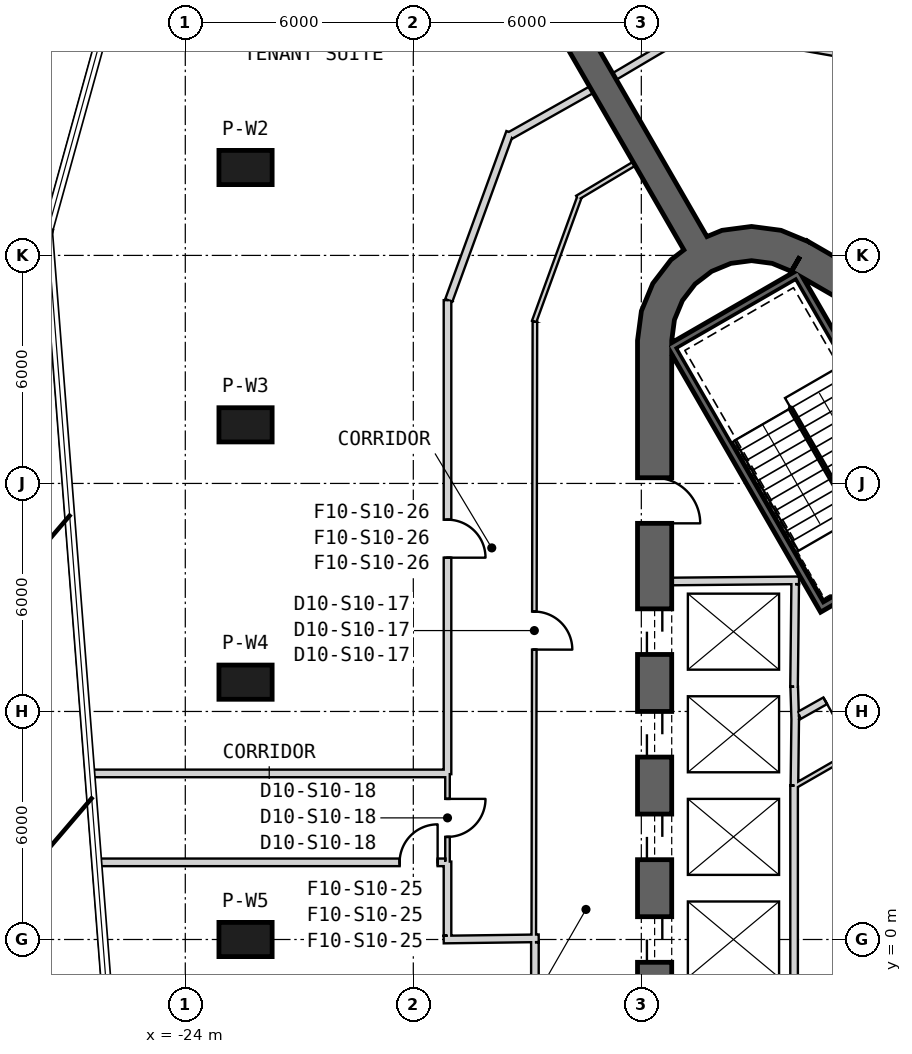
"""IFC4 building model, lengths in metres.
Left out: names, types, materials, properties, quantities, classifications, styles, units other than length and angle.
Written with IfcOpenShell. Run it as: python <this file> out.ifc"""

import sys

from ifc_helpers import new_model, si_unit, direction, frame, frame_2d, origin, origin_2d, place, context, subcontext, project, spatial, polyline, rectangle, outline, extrude, element, fill, save


model = new_model("IFC4")
c1 = context("Model", 3, precision=1e-05, world=origin(), true_north=direction((0.0, 1.0)))
c2 = subcontext(c1, "Body", "Model", "MODEL_VIEW")
j1 = project(units=[si_unit("LENGTHUNIT", "METRE"), si_unit("PLANEANGLEUNIT", "RADIAN")], contexts=[c1])
p1 = place(None, origin())
s1 = spatial("IfcSite", under=j1, at=p1, CompositionType="ELEMENT")
p2 = place(p1, origin())
s2 = spatial("IfcBuilding", under=s1, at=p2, CompositionType="ELEMENT")
p3 = place(p2, frame((0.0, 0.0, 181.2)))
s3 = spatial("IfcBuildingStorey", under=s2, at=p3, CompositionType="ELEMENT", Elevation=181.2)
for number, where, z_axis, x_axis in (
    (1, (-22.415, 20.313, 0.0), (0.0, 0.0, 1.0), (-1.0, 0.0, 0.0)),
    (2, (-22.415, 13.542, 0.0), (0.0, 0.0, 1.0), (-1.0, 0.0, 0.0)),
    (3, (-22.415, 6.771, 0.0), (0.0, 0.0, 1.0), (-1.0, 0.0, 0.0)),
    (4, (-22.415, 0.0, 0.0), (0.0, 0.0, 1.0), (-1.0, 0.0, 0.0)),
):
    element("IfcColumn", number, at=place(p3, frame(where, z_axis=z_axis, x_axis=x_axis)), inside=s3, PredefinedType="COLUMN", context=c2, shape_type="SweptSolid", body=[
        extrude(rectangle(XDim=1.4, YDim=0.9, at=origin_2d()), origin(), (0.0, 0.0, 1.0), 4.0),
    ])
p4 = place(p3, frame((19.475, 2.208, 0.0), z_axis=(0.0, 0.0, 1.0), x_axis=(-0.866028369851, 0.499994862586, 0.0)))
e5 = element("IfcWall", 5, at=p4, inside=s3, PredefinedType="SHEAR", context=c2, shape_type="SweptSolid", body=[
    extrude(rectangle(XDim=31.523, YDim=0.9, at=frame_2d((15.762, 0.0))), origin(), (0.0, 0.0, 1.0), 4.0),
])
p5 = place(p4, frame((7.062, 0.0, 0.0)))
e6 = element("IfcOpeningElement", 6, at=p5, cuts=e5, PredefinedType="OPENING", context=c2, shape_type="SweptSolid", body=[
    extrude(rectangle(XDim=1.2, YDim=2.4, at=frame_2d((0.6, 1.2))), frame((0.0, 0.46, 0.0), z_axis=(0.0, -1.0, 0.0), x_axis=(1.0, 0.0, 0.0)), (0.0, 0.0, 1.0), 0.92),
])
p6 = place(p4, frame((3.612, 0.0, 0.0)))
e7 = element("IfcOpeningElement", 7, at=p6, cuts=e5, PredefinedType="OPENING", context=c2, shape_type="SweptSolid", body=[
    extrude(rectangle(XDim=1.2, YDim=2.4, at=frame_2d((0.6, 1.2))), frame((0.0, 0.46, 0.0), z_axis=(0.0, -1.0, 0.0), x_axis=(1.0, 0.0, 0.0)), (0.0, 0.0, 1.0), 0.92),
])
p7 = place(p4, frame((26.712, 0.0, 0.0)))
e8 = element("IfcOpeningElement", 8, at=p7, cuts=e5, PredefinedType="OPENING", context=c2, shape_type="SweptSolid", body=[
    extrude(rectangle(XDim=1.2, YDim=2.4, at=frame_2d((0.6, 1.2))), frame((0.0, 0.46, 0.0), z_axis=(0.0, -1.0, 0.0), x_axis=(1.0, 0.0, 0.0)), (0.0, 0.0, 1.0), 0.92),
])
p8 = place(p3, frame((-11.65, 15.762, 0.0), z_axis=(0.0, 0.0, 1.0), x_axis=(0.0, -1.0, 0.0)))
e9 = element("IfcWall", 9, at=p8, inside=s3, PredefinedType="SHEAR", context=c2, shape_type="SweptSolid", body=[
    extrude(rectangle(XDim=31.523, YDim=0.9, at=frame_2d((15.762, 0.0))), origin(), (0.0, 0.0, 1.0), 4.0),
])
p9 = place(p8, frame((7.062, 0.0, 0.0)))
e10 = element("IfcOpeningElement", 10, at=p9, cuts=e9, PredefinedType="OPENING", context=c2, shape_type="SweptSolid", body=[
    extrude(rectangle(XDim=1.2, YDim=2.4, at=frame_2d((0.6, 1.2))), frame((0.0, 0.46, 0.0), z_axis=(0.0, -1.0, 0.0), x_axis=(1.0, 0.0, 0.0)), (0.0, 0.0, 1.0), 0.92),
])
p10 = place(p8, frame((9.762, 0.0, 0.0)))
e11 = element("IfcOpeningElement", 11, at=p10, cuts=e9, PredefinedType="OPENING", context=c2, shape_type="SweptSolid", body=[
    extrude(rectangle(XDim=1.2, YDim=2.4, at=frame_2d((0.6, 1.2))), frame((0.0, 0.46, 0.0), z_axis=(0.0, -1.0, 0.0), x_axis=(1.0, 0.0, 0.0)), (0.0, 0.0, 1.0), 0.92),
])
p11 = place(p8, frame((12.462, 0.0, 0.0)))
e12 = element("IfcOpeningElement", 12, at=p11, cuts=e9, PredefinedType="OPENING", context=c2, shape_type="SweptSolid", body=[
    extrude(rectangle(XDim=1.2, YDim=2.4, at=frame_2d((0.6, 1.2))), frame((0.0, 0.46, 0.0), z_axis=(0.0, -1.0, 0.0), x_axis=(1.0, 0.0, 0.0)), (0.0, 0.0, 1.0), 0.92),
])
p12 = place(p8, frame((15.162, 0.0, 0.0)))
e13 = element("IfcOpeningElement", 13, at=p12, cuts=e9, PredefinedType="OPENING", context=c2, shape_type="SweptSolid", body=[
    extrude(rectangle(XDim=1.2, YDim=2.4, at=frame_2d((0.6, 1.2))), frame((0.0, 0.46, 0.0), z_axis=(0.0, -1.0, 0.0), x_axis=(1.0, 0.0, 0.0)), (0.0, 0.0, 1.0), 0.92),
])
p13 = place(p8, frame((17.862, 0.0, 0.0)))
e14 = element("IfcOpeningElement", 14, at=p13, cuts=e9, PredefinedType="OPENING", context=c2, shape_type="SweptSolid", body=[
    extrude(rectangle(XDim=1.2, YDim=2.4, at=frame_2d((0.6, 1.2))), frame((0.0, 0.46, 0.0), z_axis=(0.0, -1.0, 0.0), x_axis=(1.0, 0.0, 0.0)), (0.0, 0.0, 1.0), 0.92),
])
p14 = place(p8, frame((20.562, 0.0, 0.0)))
e15 = element("IfcOpeningElement", 15, at=p14, cuts=e9, PredefinedType="OPENING", context=c2, shape_type="SweptSolid", body=[
    extrude(rectangle(XDim=1.2, YDim=2.4, at=frame_2d((0.6, 1.2))), frame((0.0, 0.46, 0.0), z_axis=(0.0, -1.0, 0.0), x_axis=(1.0, 0.0, 0.0)), (0.0, 0.0, 1.0), 0.92),
])
p15 = place(p8, frame((23.262, 0.0, 0.0)))
e16 = element("IfcOpeningElement", 16, at=p15, cuts=e9, PredefinedType="OPENING", context=c2, shape_type="SweptSolid", body=[
    extrude(rectangle(XDim=1.2, YDim=2.4, at=frame_2d((0.6, 1.2))), frame((0.0, 0.46, 0.0), z_axis=(0.0, -1.0, 0.0), x_axis=(1.0, 0.0, 0.0)), (0.0, 0.0, 1.0), 0.92),
])
p16 = place(p8, frame((3.612, 0.0, 0.0)))
e17 = element("IfcOpeningElement", 17, at=p16, cuts=e9, PredefinedType="OPENING", context=c2, shape_type="SweptSolid", body=[
    extrude(rectangle(XDim=1.2, YDim=2.4, at=frame_2d((0.6, 1.2))), frame((0.0, 0.46, 0.0), z_axis=(0.0, -1.0, 0.0), x_axis=(1.0, 0.0, 0.0)), (0.0, 0.0, 1.0), 0.92),
])
p17 = place(p8, frame((26.712, 0.0, 0.0)))
e18 = element("IfcOpeningElement", 18, at=p17, cuts=e9, PredefinedType="OPENING", context=c2, shape_type="SweptSolid", body=[
    extrude(rectangle(XDim=1.2, YDim=2.4, at=frame_2d((0.6, 1.2))), frame((0.0, 0.46, 0.0), z_axis=(0.0, -1.0, 0.0), x_axis=(1.0, 0.0, 0.0)), (0.0, 0.0, 1.0), 0.92),
])
p18 = place(p3, origin())
e19 = element("IfcWall", 19, at=p18, inside=s3, PredefinedType="SHEAR", context=c2, shape_type="SweptSolid", body=[
    extrude(outline(polyline([(-7.6, 18.36), (-8.323, 18.659), (-9.1, 18.762), (-9.876, 18.659), (-10.6, 18.36), (-11.221, 17.883), (-11.698, 17.262), (-11.998, 16.538), (-12.1, 15.762), (-11.2, 15.762), (-11.128, 16.305), (-10.919, 16.812), (-10.585, 17.247), (-10.15, 17.58), (-9.644, 17.79), (-9.1, 17.862), (-8.556, 17.79), (-8.05, 17.58), (-7.6, 18.36)])), origin(), (0.0, 0.0, 1.0), 4.0),
])
p19 = place(p3, frame((-10.575, 18.316, 0.0), z_axis=(0.0, 0.0, 1.0), x_axis=(-0.500002625756, 0.866023887798, 0.0)))
e20 = element("IfcWall", 20, at=p19, inside=s3, PredefinedType="SHEAR", context=c2, shape_type="SweptSolid", body=[
    extrude(rectangle(XDim=12.22, YDim=0.7, at=frame_2d((6.11, 0.0))), origin(), (0.0, 0.0, 1.0), 4.0),
])
p20 = place(p3, frame((-11.2, 9.42, 0.0), z_axis=(0.0, 0.0, 1.0), x_axis=(0.999957167047, 0.009255488683, 0.0)))
e21 = element("IfcWall", 21, at=p20, inside=s3, PredefinedType="PLUMBINGWALL", context=c2, shape_type="SweptSolid", body=[
    extrude(rectangle(XDim=3.35, YDim=0.2, at=frame_2d((1.675, 0.0))), origin(), (0.0, 0.0, 1.0), 3.7),
])
p21 = place(p3, frame((-7.951, 9.35, 0.0), z_axis=(0.0, 0.0, 1.0), x_axis=(-0.011120469654, -0.999938165666, 0.0)))
e22 = element("IfcWall", 22, at=p21, inside=s3, PredefinedType="PLUMBINGWALL", context=c2, shape_type="SweptSolid", body=[
    extrude(rectangle(XDim=2.7, YDim=0.2, at=frame_2d((1.35, 0.0))), origin(), (0.0, 0.0, 1.0), 3.7),
])
p22 = place(p3, frame((-7.977, 6.65, 0.0), z_axis=(0.0, 0.0, 1.0), x_axis=(0.030861509705, -0.999523670164, 0.0)))
e23 = element("IfcWall", 23, at=p22, inside=s3, PredefinedType="PLUMBINGWALL", context=c2, shape_type="SweptSolid", body=[
    extrude(rectangle(XDim=0.878, YDim=0.2, at=frame_2d((0.439, 0.0))), origin(), (0.0, 0.0, 1.0), 3.7),
])
p23 = place(p3, frame((-7.949, 5.895, 0.0), z_axis=(0.0, 0.0, 1.0), x_axis=(-0.012042535896, -0.999927486035, 0.0)))
e24 = element("IfcWall", 24, at=p23, inside=s3, PredefinedType="PLUMBINGWALL", context=c2, shape_type="SweptSolid", body=[
    extrude(rectangle(XDim=1.845, YDim=0.2, at=frame_2d((0.922, 0.0))), origin(), (0.0, 0.0, 1.0), 3.7),
])
p24 = place(p3, frame((-7.98, 4.05, 0.0), z_axis=(0.0, 0.0, 1.0), x_axis=(0.0, -1.0, 0.0)))
e25 = element("IfcWall", 25, at=p24, inside=s3, PredefinedType="PLUMBINGWALL", context=c2, shape_type="SweptSolid", body=[
    extrude(rectangle(XDim=8.1, YDim=0.2, at=frame_2d((4.05, 0.0))), origin(), (0.0, 0.0, 1.0), 3.7),
])
p25 = place(p3, frame((-11.245, 15.678, -0.3), z_axis=(0.0, 0.0, 1.0), x_axis=(0.499977274689, -0.866038523851, 0.0)))
e26 = element("IfcWall", 26, at=p25, inside=s3, PredefinedType="SHEAR", context=c2, shape_type="SweptSolid", body=[
    extrude(rectangle(XDim=8.1, YDim=0.2, at=frame_2d((4.05, 0.0))), origin(), (0.0, 0.0, 1.0), 4.0),
])
p26 = place(p3, frame((-7.818, 17.541, -0.3), z_axis=(0.0, 0.0, 1.0), x_axis=(-0.866044365799, -0.499967155389, 0.0)))
e27 = element("IfcWall", 27, at=p26, inside=s3, PredefinedType="SHEAR", context=c2, shape_type="SweptSolid", body=[
    extrude(rectangle(XDim=3.8, YDim=0.2, at=frame_2d((1.9, 0.0))), origin(), (0.0, 0.0, 1.0), 4.0),
])
p27 = place(p3, frame((-7.854, 17.405, -0.3), z_axis=(0.0, 0.0, 1.0), x_axis=(0.499997992926, -0.866026562566, 0.0)))
e28 = element("IfcWall", 28, at=p27, inside=s3, PredefinedType="SHEAR", context=c2, shape_type="SweptSolid", body=[
    extrude(rectangle(XDim=7.9, YDim=0.2, at=frame_2d((3.95, 0.0))), origin(), (0.0, 0.0, 1.0), 4.0),
])
p28 = place(p3, frame((-7.159, 8.8, -0.3), z_axis=(0.0, 0.0, 1.0), x_axis=(0.866047807691, 0.499961193289, 0.0)))
e29 = element("IfcWall", 29, at=p28, inside=s3, PredefinedType="SHEAR", context=c2, shape_type="SweptSolid", body=[
    extrude(rectangle(XDim=3.6, YDim=0.2, at=frame_2d((1.8, 0.0))), origin(), (0.0, 0.0, 1.0), 4.0),
])
p29 = place(p28, frame((1.25, 0.0, 0.3)))
e30 = element("IfcOpeningElement", 30, at=p29, cuts=e29, PredefinedType="OPENING", context=c2, shape_type="SweptSolid", body=[
    extrude(rectangle(XDim=1.1, YDim=2.1, at=frame_2d((0.55, 1.05))), frame((0.0, 0.11, 0.0), z_axis=(0.0, -1.0, 0.0), x_axis=(1.0, 0.0, 0.0)), (0.0, 0.0, 1.0), 0.22),
])
p30 = place(p3, frame((-5.6, 7.16, 0.0), z_axis=(0.0, 0.0, 1.0), x_axis=(-0.871363259478, -0.490638431059, 0.0)))
e31 = element("IfcWall", 31, at=p30, inside=s3, PredefinedType="PARTITIONING", context=c2, shape_type="SweptSolid", body=[
    extrude(rectangle(XDim=2.581, YDim=0.2, at=frame_2d((1.291, 0.0))), origin(), (0.0, 0.0, 1.0), 3.7),
])
p31 = place(p30, frame((0.791, 0.0, 0.0)))
e32 = element("IfcOpeningElement", 32, at=p31, cuts=e31, PredefinedType="OPENING", context=c2, shape_type="SweptSolid", body=[
    extrude(rectangle(XDim=1.0, YDim=2.1, at=frame_2d((0.5, 1.05))), frame((0.0, 0.11, 0.0), z_axis=(0.0, -1.0, 0.0), x_axis=(1.0, 0.0, 0.0)), (0.0, 0.0, 1.0), 0.22),
])
p32 = place(p3, frame((-6.201, 5.046, 0.0), z_axis=(0.0, 0.0, 1.0), x_axis=(-0.867071050325, -0.498184497639, 0.0)))
e33 = element("IfcWall", 33, at=p32, inside=s3, PredefinedType="PARTITIONING", context=c2, shape_type="SweptSolid", body=[
    extrude(rectangle(XDim=2.017, YDim=0.12, at=frame_2d((1.008, 0.0))), origin(), (0.0, 0.0, 1.0), 3.7),
])
p33 = place(p3, frame((-12.189, 20.411, 0.0), z_axis=(0.0, 0.0, 1.0), x_axis=(-0.858492721014, -0.51282574815, 0.0)))
e34 = element("IfcWall", 34, at=p33, inside=s3, PredefinedType="PARTITIONING", context=c2, shape_type="SweptSolid", body=[
    extrude(rectangle(XDim=1.742, YDim=0.12, at=frame_2d((0.871, 0.0))), origin(), (0.0, 0.0, 1.0), 3.7),
])
p34 = place(p3, frame((-13.631, 19.53, 0.0), z_axis=(0.0, 0.0, 1.0), x_axis=(-0.342069878069, -0.939674517329, 0.0)))
e35 = element("IfcWall", 35, at=p34, inside=s3, PredefinedType="PARTITIONING", context=c2, shape_type="SweptSolid", body=[
    extrude(rectangle(XDim=3.479, YDim=0.12, at=frame_2d((1.739, 0.0))), origin(), (0.0, 0.0, 1.0), 2.78),
])
p35 = place(p3, frame((-14.8, 16.257, 0.0), z_axis=(0.0, 0.0, 1.0), x_axis=(-0.001847148781, -0.999998294019, 0.0)))
e36 = element("IfcWall", 36, at=p35, inside=s3, PredefinedType="PARTITIONING", context=c2, shape_type="SweptSolid", body=[
    extrude(rectangle(XDim=16.257, YDim=0.12, at=frame_2d((8.128, 0.0))), origin(), (0.0, 0.0, 1.0), 2.88),
])
p36 = place(p35, frame((7.629, 0.0, 0.0)))
e37 = element("IfcOpeningElement", 37, at=p36, cuts=e36, PredefinedType="OPENING", context=c2, shape_type="SweptSolid", body=[
    extrude(rectangle(XDim=1.0, YDim=2.1, at=frame_2d((0.5, 1.05))), frame((0.0, 0.07, 0.0), z_axis=(0.0, -1.0, 0.0), x_axis=(1.0, 0.0, 0.0)), (0.0, 0.0, 1.0), 0.14),
])
p37 = place(p3, frame((-17.1, 4.35, 0.0), z_axis=(0.0, 0.0, 1.0), x_axis=(0.0, -1.0, 0.0)))
e38 = element("IfcWall", 38, at=p37, inside=s3, PredefinedType="PARTITIONING", context=c2, shape_type="SweptSolid", body=[
    extrude(rectangle(XDim=2.3, YDim=0.12, at=frame_2d((1.15, 0.0))), origin(), (0.0, 0.0, 1.0), 3.7),
])
p38 = place(p37, frame((0.65, 0.0, 0.0)))
e39 = element("IfcOpeningElement", 39, at=p38, cuts=e38, PredefinedType="OPENING", context=c2, shape_type="SweptSolid", body=[
    extrude(rectangle(XDim=1.0, YDim=2.1, at=frame_2d((0.5, 1.05))), frame((0.0, 0.07, 0.0), z_axis=(0.0, -1.0, 0.0), x_axis=(1.0, 0.0, 0.0)), (0.0, 0.0, 1.0), 0.14),
])
p39 = place(p3, frame((-17.2, -0.001, 0.0), z_axis=(0.0, 0.0, 1.0), x_axis=(0.999915662945, 0.012987185857, 0.0)))
e40 = element("IfcWall", 40, at=p39, inside=s3, PredefinedType="PARTITIONING", context=c2, shape_type="SweptSolid", body=[
    extrude(rectangle(XDim=2.5, YDim=0.2, at=frame_2d((1.25, 0.0))), origin(), (0.0, 0.0, 1.0), 3.07),
])
p40 = place(p3, frame((-17.1, 16.823, 0.0), z_axis=(0.0, 0.0, 1.0), x_axis=(0.0, -1.0, 0.0)))
e41 = element("IfcWall", 41, at=p40, inside=s3, PredefinedType="PARTITIONING", context=c2, shape_type="SweptSolid", body=[
    extrude(rectangle(XDim=12.473, YDim=0.2, at=frame_2d((6.236, 0.0))), origin(), (0.0, 0.0, 1.0), 2.88),
])
p41 = place(p40, frame((5.776, 0.0, 0.0)))
e42 = element("IfcOpeningElement", 42, at=p41, cuts=e41, PredefinedType="OPENING", context=c2, shape_type="SweptSolid", body=[
    extrude(rectangle(XDim=1.0, YDim=2.1, at=frame_2d((0.5, 1.05))), frame((0.0, 0.11, 0.0), z_axis=(0.0, -1.0, 0.0), x_axis=(1.0, 0.0, 0.0)), (0.0, 0.0, 1.0), 0.22),
])
p42 = place(p3, frame((-17.1, 2.05, 0.0), z_axis=(0.0, 0.0, 1.0), x_axis=(0.0, -1.0, 0.0)))
e43 = element("IfcWall", 43, at=p42, inside=s3, PredefinedType="PARTITIONING", context=c2, shape_type="SweptSolid", body=[
    extrude(rectangle(XDim=1.95, YDim=0.2, at=frame_2d((0.975, 0.0))), origin(), (0.0, 0.0, 1.0), 3.07),
])
p43 = place(p3, frame((-15.456, 21.239, 0.0), z_axis=(0.0, 0.0, 1.0), x_axis=(-0.34205546997, -0.939679762187, 0.0)))
e44 = element("IfcWall", 44, at=p43, inside=s3, PredefinedType="PARTITIONING", context=c2, shape_type="SweptSolid", body=[
    extrude(rectangle(XDim=4.706, YDim=0.2, at=frame_2d((2.353, 0.0))), origin(), (0.0, 0.0, 1.0), 2.78),
])
p44 = place(p3, frame((-13.313, 22.359, 0.0), z_axis=(0.0, 0.0, 1.0), x_axis=(-0.87121710687, -0.490897904555, 0.0)))
e45 = element("IfcWall", 45, at=p44, inside=s3, PredefinedType="PARTITIONING", context=c2, shape_type="SweptSolid", body=[
    extrude(rectangle(XDim=2.457, YDim=0.2, at=frame_2d((1.229, 0.0))), origin(), (0.0, 0.0, 1.0), 3.7),
])
p45 = place(p3, frame((-14.8, -0.07, 0.0), z_axis=(0.0, 0.0, 1.0), x_axis=(0.0, -1.0, 0.0)))
e46 = element("IfcWall", 46, at=p45, inside=s3, PredefinedType="PARTITIONING", context=c2, shape_type="SweptSolid", body=[
    extrude(rectangle(XDim=16.147, YDim=0.2, at=frame_2d((8.073, 0.0))), origin(), (0.0, 0.0, 1.0), 2.88),
])
p46 = place(p3, frame((-10.449, 24.044, 0.0), z_axis=(0.0, 0.0, 1.0), x_axis=(-0.860744847861, -0.509036645912, 0.0)))
e47 = element("IfcWall", 47, at=p46, inside=s3, PredefinedType="PARTITIONING", context=c2, shape_type="SweptSolid", body=[
    extrude(rectangle(XDim=2.623, YDim=0.2, at=frame_2d((1.311, 0.0))), origin(), (0.0, 0.0, 1.0), 3.7),
])
p47 = place(p3, frame((-5.834, 23.153, 0.0), z_axis=(0.0, 0.0, 1.0), x_axis=(-0.98481258102, 0.173620794447, 0.0)))
e48 = element("IfcWall", 48, at=p47, inside=s3, PredefinedType="PARTITIONING", context=c2, shape_type="SweptSolid", body=[
    extrude(rectangle(XDim=4.74, YDim=0.2, at=frame_2d((2.37, 0.0))), origin(), (0.0, 0.0, 1.0), 2.78),
])
p48 = place(p3, frame((-26.332, 2.03, 0.0), z_axis=(0.0, 0.0, 1.0), x_axis=(0.999999999646, 2.6619107e-05, 0.0)))
e49 = element("IfcWall", 49, at=p48, inside=s3, PredefinedType="PARTITIONING", context=c2, shape_type="SweptSolid", body=[
    extrude(rectangle(XDim=9.172, YDim=0.2, at=frame_2d((4.586, 0.0))), origin(), (0.0, 0.0, 1.0), 3.7),
])
p49 = place(p48, frame((7.972, 0.0, 0.0)))
e50 = element("IfcOpeningElement", 50, at=p49, cuts=e49, PredefinedType="OPENING", context=c2, shape_type="SweptSolid", body=[
    extrude(rectangle(XDim=1.0, YDim=2.1, at=frame_2d((0.5, 1.05))), frame((0.0, 0.11, 0.0), z_axis=(0.0, -1.0, 0.0), x_axis=(1.0, 0.0, 0.0)), (0.0, 0.0, 1.0), 0.22),
])
p50 = place(p3, frame((-17.16, 4.37, 0.0), z_axis=(0.0, 0.0, 1.0), x_axis=(-1.0, 0.0, 0.0)))
e51 = element("IfcWall", 51, at=p50, inside=s3, PredefinedType="PARTITIONING", context=c2, shape_type="SweptSolid", body=[
    extrude(rectangle(XDim=9.354, YDim=0.2, at=frame_2d((4.677, 0.0))), origin(), (0.0, 0.0, 1.0), 3.7),
])
p51 = place(p31, origin())
e52 = element("IfcDoor", 52, at=p51, inside=s3, OperationType="SINGLE_SWING_LEFT", PredefinedType="USERDEFINED", context=c2, shape_type="SweptSolid", body=[
    extrude(rectangle(XDim=1.0, YDim=2.1, at=frame_2d((0.5, 1.05))), frame((0.0, 0.025, 0.0), z_axis=(0.0, -1.0, 0.0), x_axis=(1.0, 0.0, 0.0)), (0.0, 0.0, 1.0), 0.05),
])
fill(e32, e52)
p52 = place(p36, origin())
e53 = element("IfcDoor", 53, at=p52, inside=s3, OperationType="SINGLE_SWING_LEFT", PredefinedType="NOTDEFINED", context=c2, shape_type="SweptSolid", body=[
    extrude(rectangle(XDim=1.0, YDim=2.1, at=frame_2d((0.5, 1.05))), frame((0.0, 0.025, 0.0), z_axis=(0.0, -1.0, 0.0), x_axis=(1.0, 0.0, 0.0)), (0.0, 0.0, 1.0), 0.05),
])
fill(e37, e53)
p53 = place(p38, origin())
e54 = element("IfcDoor", 54, at=p53, inside=s3, OperationType="SINGLE_SWING_RIGHT", PredefinedType="NOTDEFINED", context=c2, shape_type="SweptSolid", body=[
    extrude(rectangle(XDim=1.0, YDim=2.1, at=frame_2d((0.5, 1.05))), frame((0.0, 0.025, 0.0), z_axis=(0.0, -1.0, 0.0), x_axis=(1.0, 0.0, 0.0)), (0.0, 0.0, 1.0), 0.05),
])
fill(e39, e54)
p54 = place(p49, origin())
e55 = element("IfcDoor", 55, at=p54, inside=s3, OperationType="SINGLE_SWING_LEFT", PredefinedType="USERDEFINED", context=c2, shape_type="SweptSolid", body=[
    extrude(rectangle(XDim=1.0, YDim=2.1, at=frame_2d((0.5, 1.05))), frame((0.0, 0.025, 0.0), z_axis=(0.0, -1.0, 0.0), x_axis=(1.0, 0.0, 0.0)), (0.0, 0.0, 1.0), 0.05),
])
fill(e50, e55)
p55 = place(p41, origin())
e56 = element("IfcDoor", 56, at=p55, inside=s3, OperationType="SINGLE_SWING_RIGHT", PredefinedType="USERDEFINED", context=c2, shape_type="SweptSolid", body=[
    extrude(rectangle(XDim=1.0, YDim=2.1, at=frame_2d((0.5, 1.05))), frame((0.0, 0.025, 0.0), z_axis=(0.0, -1.0, 0.0), x_axis=(1.0, 0.0, 0.0)), (0.0, 0.0, 1.0), 0.05),
])
fill(e42, e56)
p56 = place(p9, origin())
e57 = element("IfcDoor", 57, at=p56, inside=s3, OperationType="SLIDING_TO_LEFT", PredefinedType="USERDEFINED", context=c2, shape_type="SweptSolid", body=[
    extrude(rectangle(XDim=1.2, YDim=2.4, at=frame_2d((0.6, 1.2))), frame((0.0, 0.025, 0.0), z_axis=(0.0, -1.0, 0.0), x_axis=(1.0, 0.0, 0.0)), (0.0, 0.0, 1.0), 0.05),
])
fill(e10, e57)
p57 = place(p10, origin())
e58 = element("IfcDoor", 58, at=p57, inside=s3, OperationType="SLIDING_TO_LEFT", PredefinedType="USERDEFINED", context=c2, shape_type="SweptSolid", body=[
    extrude(rectangle(XDim=1.2, YDim=2.4, at=frame_2d((0.6, 1.2))), frame((0.0, 0.025, 0.0), z_axis=(0.0, -1.0, 0.0), x_axis=(1.0, 0.0, 0.0)), (0.0, 0.0, 1.0), 0.05),
])
fill(e11, e58)
p58 = place(p11, origin())
e59 = element("IfcDoor", 59, at=p58, inside=s3, OperationType="SLIDING_TO_LEFT", PredefinedType="USERDEFINED", context=c2, shape_type="SweptSolid", body=[
    extrude(rectangle(XDim=1.2, YDim=2.4, at=frame_2d((0.6, 1.2))), frame((0.0, 0.025, 0.0), z_axis=(0.0, -1.0, 0.0), x_axis=(1.0, 0.0, 0.0)), (0.0, 0.0, 1.0), 0.05),
])
fill(e12, e59)
p59 = place(p12, origin())
e60 = element("IfcDoor", 60, at=p59, inside=s3, OperationType="SLIDING_TO_LEFT", PredefinedType="USERDEFINED", context=c2, shape_type="SweptSolid", body=[
    extrude(rectangle(XDim=1.2, YDim=2.4, at=frame_2d((0.6, 1.2))), frame((0.0, 0.025, 0.0), z_axis=(0.0, -1.0, 0.0), x_axis=(1.0, 0.0, 0.0)), (0.0, 0.0, 1.0), 0.05),
])
fill(e13, e60)
p60 = place(p16, origin())
e61 = element("IfcDoor", 61, at=p60, inside=s3, OperationType="SINGLE_SWING_RIGHT", PredefinedType="USERDEFINED", context=c2, shape_type="SweptSolid", body=[
    extrude(rectangle(XDim=1.2, YDim=2.4, at=frame_2d((0.6, 1.2))), frame((0.0, 0.025, 0.0), z_axis=(0.0, -1.0, 0.0), x_axis=(1.0, 0.0, 0.0)), (0.0, 0.0, 1.0), 0.05),
])
fill(e17, e61)
save(model, sys.argv[1])
